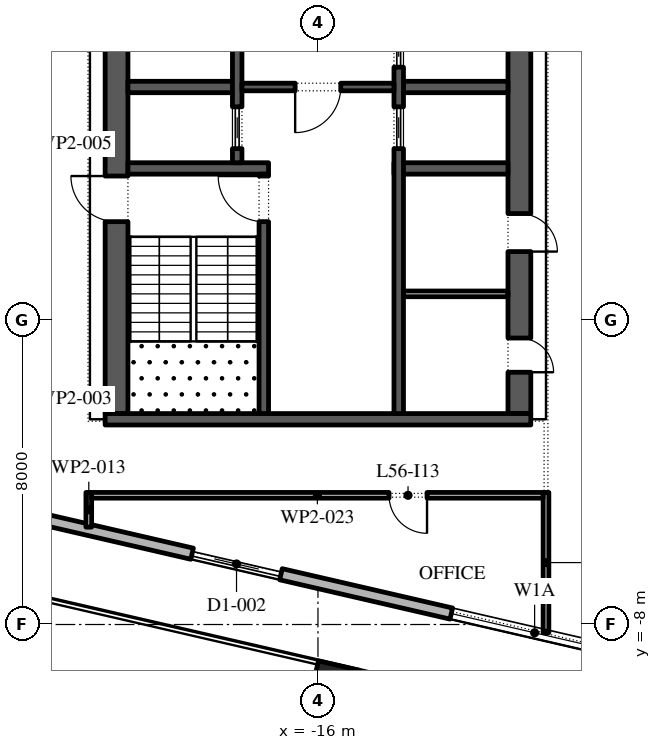
"""IFC4 building model, lengths in metres.
Left out: names, types, materials, properties, quantities, classifications, styles, units other than length and angle.
Written with IfcOpenShell. Run it as: python <this file> out.ifc"""

import sys

from ifc_helpers import new_model, si_unit, direction, frame, frame_2d, origin, origin_2d, place, context, subcontext, project, spatial, rectangle, extrude, element, fill, save


model = new_model("IFC4")
c1 = context("Model", 3, precision=1e-05, world=origin(), true_north=direction((0.0, 1.0)))
c2 = subcontext(c1, "Body", "Model", "MODEL_VIEW")
j1 = project(units=[si_unit("LENGTHUNIT", "METRE"), si_unit("PLANEANGLEUNIT", "RADIAN")], contexts=[c1])
p1 = place(None, origin())
s1 = spatial("IfcSite", under=j1, at=p1, CompositionType="ELEMENT")
p2 = place(p1, origin())
s2 = spatial("IfcBuilding", under=s1, at=p2, CompositionType="ELEMENT")
p3 = place(p2, frame((0.0, 0.0, 259.8)))
s3 = spatial("IfcBuildingStorey", under=s2, at=p3, CompositionType="ELEMENT", Elevation=259.8)
p4 = place(p3, frame((-15.574, -9.617, 0.0), z_axis=(0.0, 0.0, 1.0), x_axis=(0.974370064785, -0.224951054344, 0.0)))
e1 = element("IfcColumn", 1, at=p4, inside=s3, PredefinedType="COLUMN", context=c2, shape_type="SweptSolid", body=[
    extrude(rectangle(XDim=1.1, YDim=1.1, at=origin_2d()), origin(), (0.0, 0.0, 1.0), 4.2),
])
p5 = place(p3, frame((-29.616, -3.758, 0.0), z_axis=(0.0, 0.0, 1.0), x_axis=(0.974370532314, -0.224949029246, 0.0)))
e2 = element("IfcWall", 2, at=p5, inside=s3, PredefinedType="STANDARD", context=c2, shape_type="SweptSolid", body=[
    extrude(rectangle(XDim=48.0, YDim=0.3, at=frame_2d((24.0, 0.0))), origin(), (0.0, 0.0, 1.0), 4.0),
])
p6 = place(p5, frame((1.625, 0.0, 0.45)))
e3 = element("IfcOpeningElement", 3, at=p6, cuts=e2, PredefinedType="OPENING", context=c2, shape_type="SweptSolid", body=[
    extrude(rectangle(XDim=4.5, YDim=3.05, at=frame_2d((2.25, 1.525))), frame((0.0, 0.16, 0.0), z_axis=(0.0, -1.0, 0.0), x_axis=(1.0, 0.0, 0.0)), (0.0, 0.0, 1.0), 0.32),
])
p7 = place(p5, frame((10.575, 0.0, 0.0)))
e4 = element("IfcOpeningElement", 4, at=p7, cuts=e2, PredefinedType="OPENING", context=c2, shape_type="SweptSolid", body=[
    extrude(rectangle(XDim=2.4, YDim=3.5, at=frame_2d((1.2, 1.75))), frame((0.0, 0.16, 0.0), z_axis=(0.0, -1.0, 0.0), x_axis=(1.0, 0.0, 0.0)), (0.0, 0.0, 1.0), 0.32),
])
p8 = place(p5, frame((17.575, 0.0, 0.45)))
e5 = element("IfcOpeningElement", 5, at=p8, cuts=e2, PredefinedType="OPENING", context=c2, shape_type="SweptSolid", body=[
    extrude(rectangle(XDim=4.5, YDim=3.0, at=frame_2d((2.25, 1.5))), frame((0.0, 0.16, 0.0), z_axis=(0.0, -1.0, 0.0), x_axis=(1.0, 0.0, 0.0)), (0.0, 0.0, 1.0), 0.32),
])
p9 = place(p5, frame((25.625, 0.0, 0.45)))
e6 = element("IfcOpeningElement", 6, at=p9, cuts=e2, PredefinedType="OPENING", context=c2, shape_type="SweptSolid", body=[
    extrude(rectangle(XDim=4.5, YDim=2.95, at=frame_2d((2.25, 1.475))), frame((0.0, 0.16, 0.0), z_axis=(0.0, -1.0, 0.0), x_axis=(1.0, 0.0, 0.0)), (0.0, 0.0, 1.0), 0.32),
])
p10 = place(p5, frame((33.675, 0.0, 0.45)))
e7 = element("IfcOpeningElement", 7, at=p10, cuts=e2, PredefinedType="OPENING", context=c2, shape_type="SweptSolid", body=[
    extrude(rectangle(XDim=4.5, YDim=2.825, at=frame_2d((2.25, 1.413))), frame((0.0, 0.16, 0.0), z_axis=(0.0, -1.0, 0.0), x_axis=(1.0, 0.0, 0.0)), (0.0, 0.0, 1.0), 0.32),
])
p11 = place(p5, frame((42.775, 0.0, 0.0)))
e8 = element("IfcOpeningElement", 8, at=p11, cuts=e2, PredefinedType="OPENING", context=c2, shape_type="SweptSolid", body=[
    extrude(rectangle(XDim=2.4, YDim=3.5, at=frame_2d((1.2, 1.75))), frame((0.0, 0.16, 0.0), z_axis=(0.0, -1.0, 0.0), x_axis=(1.0, 0.0, 0.0)), (0.0, 0.0, 1.0), 0.32),
])
p12 = place(p3, frame((-21.359, 48.678, 0.0), z_axis=(0.0, 0.0, 1.0), x_axis=(-0.224949198343, -0.974370493275, 0.0)))
e9 = element("IfcWall", 9, at=p12, inside=s3, PredefinedType="STANDARD", context=c2, shape_type="SweptSolid", body=[
    extrude(rectangle(XDim=49.5, YDim=0.3, at=frame_2d((24.75, 0.0))), origin(), (0.0, 0.0, 1.0), 4.0),
])
p13 = place(p12, frame((1.157, 0.0, 0.45)))
e10 = element("IfcOpeningElement", 10, at=p13, cuts=e9, PredefinedType="OPENING", context=c2, shape_type="SweptSolid", body=[
    extrude(rectangle(XDim=4.5, YDim=3.05, at=frame_2d((2.25, 1.525))), frame((0.0, 0.16, 0.0), z_axis=(0.0, -1.0, 0.0), x_axis=(1.0, 0.0, 0.0)), (0.0, 0.0, 1.0), 0.32),
])
p14 = place(p12, frame((9.171, 0.0, 0.0)))
e11 = element("IfcOpeningElement", 11, at=p14, cuts=e9, PredefinedType="OPENING", context=c2, shape_type="SweptSolid", body=[
    extrude(rectangle(XDim=2.4, YDim=3.5, at=frame_2d((1.2, 1.75))), frame((0.0, 0.16, 0.0), z_axis=(0.0, -1.0, 0.0), x_axis=(1.0, 0.0, 0.0)), (0.0, 0.0, 1.0), 0.32),
])
p15 = place(p12, frame((15.236, 0.0, 0.45)))
e12 = element("IfcOpeningElement", 12, at=p15, cuts=e9, PredefinedType="OPENING", context=c2, shape_type="SweptSolid", body=[
    extrude(rectangle(XDim=4.5, YDim=3.05, at=frame_2d((2.25, 1.525))), frame((0.0, 0.16, 0.0), z_axis=(0.0, -1.0, 0.0), x_axis=(1.0, 0.0, 0.0)), (0.0, 0.0, 1.0), 0.32),
])
p16 = place(p12, frame((22.35, 0.0, 0.45)))
e13 = element("IfcOpeningElement", 13, at=p16, cuts=e9, PredefinedType="OPENING", context=c2, shape_type="SweptSolid", body=[
    extrude(rectangle(XDim=4.5, YDim=3.05, at=frame_2d((2.25, 1.525))), frame((0.0, 0.16, 0.0), z_axis=(0.0, -1.0, 0.0), x_axis=(1.0, 0.0, 0.0)), (0.0, 0.0, 1.0), 0.32),
])
p17 = place(p12, frame((29.464, 0.0, 0.45)))
e14 = element("IfcOpeningElement", 14, at=p17, cuts=e9, PredefinedType="OPENING", context=c2, shape_type="SweptSolid", body=[
    extrude(rectangle(XDim=4.5, YDim=3.05, at=frame_2d((2.25, 1.525))), frame((0.0, 0.16, 0.0), z_axis=(0.0, -1.0, 0.0), x_axis=(1.0, 0.0, 0.0)), (0.0, 0.0, 1.0), 0.32),
])
p18 = place(p12, frame((37.628, 0.0, 0.0)))
e15 = element("IfcOpeningElement", 15, at=p18, cuts=e9, PredefinedType="OPENING", context=c2, shape_type="SweptSolid", body=[
    extrude(rectangle(XDim=2.4, YDim=3.325, at=frame_2d((1.2, 1.663))), frame((0.0, 0.16, 0.0), z_axis=(0.0, -1.0, 0.0), x_axis=(1.0, 0.0, 0.0)), (0.0, 0.0, 1.0), 0.32),
])
p19 = place(p12, frame((43.693, 0.0, 0.45)))
e16 = element("IfcOpeningElement", 16, at=p19, cuts=e9, PredefinedType="OPENING", context=c2, shape_type="SweptSolid", body=[
    extrude(rectangle(XDim=4.5, YDim=2.825, at=frame_2d((2.25, 1.413))), frame((0.0, 0.16, 0.0), z_axis=(0.0, -1.0, 0.0), x_axis=(1.0, 0.0, 0.0)), (0.0, 0.0, 1.0), 0.32),
])
p20 = place(p3, frame((-21.3, -2.45, 0.0), z_axis=(0.0, 0.0, 1.0), x_axis=(0.0, 1.0, 0.0)))
e17 = element("IfcWall", 17, at=p20, inside=s3, PredefinedType="SHEAR", context=c2, shape_type="SweptSolid", body=[
    extrude(rectangle(XDim=27.9, YDim=0.6, at=frame_2d((13.95, 0.0))), origin(), (0.0, 0.0, 1.0), 4.0),
])
p21 = place(p20, frame((5.05, 0.0, 0.0)))
e18 = element("IfcOpeningElement", 18, at=p21, cuts=e17, PredefinedType="OPENING", context=c2, shape_type="SweptSolid", body=[
    extrude(rectangle(XDim=1.2, YDim=2.1, at=frame_2d((0.6, 1.05))), frame((0.0, 0.31, 0.0), z_axis=(0.0, -1.0, 0.0), x_axis=(1.0, 0.0, 0.0)), (0.0, 0.0, 1.0), 0.62),
])
p22 = place(p20, frame((21.65, 0.0, 0.0)))
e19 = element("IfcOpeningElement", 19, at=p22, cuts=e17, PredefinedType="OPENING", context=c2, shape_type="SweptSolid", body=[
    extrude(rectangle(XDim=1.2, YDim=2.1, at=frame_2d((0.6, 1.05))), frame((0.0, 0.31, 0.0), z_axis=(0.0, -1.0, 0.0), x_axis=(1.0, 0.0, 0.0)), (0.0, 0.0, 1.0), 0.62),
])
p23 = place(p3, frame((-10.7, -2.45, 0.0), z_axis=(0.0, 0.0, 1.0), x_axis=(0.0, 1.0, 0.0)))
e20 = element("IfcWall", 20, at=p23, inside=s3, PredefinedType="SHEAR", context=c2, shape_type="SweptSolid", body=[
    extrude(rectangle(XDim=27.9, YDim=0.6, at=frame_2d((13.95, 0.0))), origin(), (0.0, 0.0, 1.0), 4.0),
])
p24 = place(p23, frame((23.65, 0.0, 0.0)))
e21 = element("IfcOpeningElement", 21, at=p24, cuts=e20, PredefinedType="OPENING", context=c2, shape_type="SweptSolid", body=[
    extrude(rectangle(XDim=2.4, YDim=2.1, at=frame_2d((1.2, 1.05))), frame((0.0, 0.31, 0.0), z_axis=(0.0, -1.0, 0.0), x_axis=(1.0, 0.0, 0.0)), (0.0, 0.0, 1.0), 0.62),
])
p25 = place(p23, frame((1.087, 0.0, 0.0)))
e22 = element("IfcOpeningElement", 22, at=p25, cuts=e20, PredefinedType="OPENING", context=c2, shape_type="SweptSolid", body=[
    extrude(rectangle(XDim=0.9, YDim=2.1, at=frame_2d((0.45, 1.05))), frame((0.0, 0.31, 0.0), z_axis=(0.0, -1.0, 0.0), x_axis=(1.0, 0.0, 0.0)), (0.0, 0.0, 1.0), 0.62),
])
p26 = place(p23, frame((4.262, 0.0, 0.0)))
e23 = element("IfcOpeningElement", 23, at=p26, cuts=e20, PredefinedType="OPENING", context=c2, shape_type="SweptSolid", body=[
    extrude(rectangle(XDim=1.0, YDim=2.1, at=frame_2d((0.5, 1.05))), frame((0.0, 0.31, 0.0), z_axis=(0.0, -1.0, 0.0), x_axis=(1.0, 0.0, 0.0)), (0.0, 0.0, 1.0), 0.62),
])
p27 = place(p3, frame((-21.6, -2.6, 0.0), z_axis=(0.0, 0.0, 1.0), x_axis=(1.0, 0.0, 0.0)))
e24 = element("IfcWall", 24, at=p27, inside=s3, PredefinedType="SHEAR", context=c2, shape_type="SweptSolid", body=[
    extrude(rectangle(XDim=11.2, YDim=0.3, at=frame_2d((5.6, 0.0))), origin(), (0.0, 0.0, 1.0), 4.0),
])
p28 = place(p3, frame((-21.0, 4.0, 0.0), z_axis=(0.0, 0.0, 1.0), x_axis=(1.0, 0.0, 0.0)))
e25 = element("IfcWall", 25, at=p28, inside=s3, PredefinedType="SHEAR", context=c2, shape_type="SweptSolid", body=[
    extrude(rectangle(XDim=3.7, YDim=0.3, at=frame_2d((1.85, 0.0))), origin(), (0.0, 0.0, 1.0), 4.0),
])
p29 = place(p3, frame((-17.425, -2.45, 0.0), z_axis=(0.0, 0.0, 1.0), x_axis=(0.0, 1.0, 0.0)))
e26 = element("IfcWall", 26, at=p29, inside=s3, PredefinedType="SHEAR", context=c2, shape_type="SweptSolid", body=[
    extrude(rectangle(XDim=6.3, YDim=0.25, at=frame_2d((3.15, 0.0))), origin(), (0.0, 0.0, 1.0), 4.0),
])
p30 = place(p29, frame((5.05, 0.0, 0.0)))
e27 = element("IfcOpeningElement", 27, at=p30, cuts=e26, PredefinedType="OPENING", context=c2, shape_type="SweptSolid", body=[
    extrude(rectangle(XDim=1.2, YDim=2.1, at=frame_2d((0.6, 1.05))), frame((0.0, 0.135, 0.0), z_axis=(0.0, -1.0, 0.0), x_axis=(1.0, 0.0, 0.0)), (0.0, 0.0, 1.0), 0.27),
])
p31 = place(p3, frame((-21.0, 6.143, 0.0), z_axis=(0.0, 0.0, 1.0), x_axis=(1.0, 0.0, 0.0)))
e28 = element("IfcWall", 28, at=p31, inside=s3, PredefinedType="SHEAR", context=c2, shape_type="SweptSolid", body=[
    extrude(rectangle(XDim=2.75, YDim=0.3, at=frame_2d((1.375, 0.0))), origin(), (0.0, 0.0, 1.0), 4.0),
])
p32 = place(p3, frame((-18.125, 4.15, 0.0), z_axis=(0.0, 0.0, 1.0), x_axis=(0.0, 1.0, 0.0)))
e29 = element("IfcWall", 29, at=p32, inside=s3, PredefinedType="SHEAR", context=c2, shape_type="SweptSolid", body=[
    extrude(rectangle(XDim=14.7, YDim=0.25, at=frame_2d((7.35, 0.0))), origin(), (0.0, 0.0, 1.0), 4.0),
])
p33 = place(p32, frame((6.9, 0.0, 0.0)))
e30 = element("IfcOpeningElement", 30, at=p33, cuts=e29, PredefinedType="OPENING", context=c2, shape_type="SweptSolid", body=[
    extrude(rectangle(XDim=0.9, YDim=2.1, at=frame_2d((0.45, 1.05))), frame((0.0, 0.135, 0.0), z_axis=(0.0, -1.0, 0.0), x_axis=(1.0, 0.0, 0.0)), (0.0, 0.0, 1.0), 0.27),
])
p34 = place(p32, frame((0.371, 0.0, 0.0)))
e31 = element("IfcOpeningElement", 31, at=p34, cuts=e29, PredefinedType="OPENING", context=c2, shape_type="SweptSolid", body=[
    extrude(rectangle(XDim=1.1, YDim=2.1, at=frame_2d((0.55, 1.05))), frame((0.0, 0.135, 0.0), z_axis=(0.0, -1.0, 0.0), x_axis=(1.0, 0.0, 0.0)), (0.0, 0.0, 1.0), 0.27),
])
p35 = place(p32, frame((13.229, 0.0, 0.0)))
e32 = element("IfcOpeningElement", 32, at=p35, cuts=e29, PredefinedType="OPENING", context=c2, shape_type="SweptSolid", body=[
    extrude(rectangle(XDim=1.1, YDim=2.1, at=frame_2d((0.55, 1.05))), frame((0.0, 0.135, 0.0), z_axis=(0.0, -1.0, 0.0), x_axis=(1.0, 0.0, 0.0)), (0.0, 0.0, 1.0), 0.27),
])
p36 = place(p3, frame((-14.0, 4.0, 0.0), z_axis=(0.0, 0.0, 1.0), x_axis=(1.0, 0.0, 0.0)))
e33 = element("IfcWall", 33, at=p36, inside=s3, PredefinedType="SHEAR", context=c2, shape_type="SweptSolid", body=[
    extrude(rectangle(XDim=3.0, YDim=0.3, at=frame_2d((1.5, 0.0))), origin(), (0.0, 0.0, 1.0), 4.0),
])
p37 = place(p3, frame((-13.75, 6.143, 0.0), z_axis=(0.0, 0.0, 1.0), x_axis=(1.0, 0.0, 0.0)))
e34 = element("IfcWall", 34, at=p37, inside=s3, PredefinedType="SHEAR", context=c2, shape_type="SweptSolid", body=[
    extrude(rectangle(XDim=2.75, YDim=0.3, at=frame_2d((1.375, 0.0))), origin(), (0.0, 0.0, 1.0), 4.0),
])
p38 = place(p3, frame((-13.875, -2.45, 0.0), z_axis=(0.0, 0.0, 1.0), x_axis=(0.0, 1.0, 0.0)))
e35 = element("IfcWall", 35, at=p38, inside=s3, PredefinedType="SHEAR", context=c2, shape_type="SweptSolid", body=[
    extrude(rectangle(XDim=21.3, YDim=0.25, at=frame_2d((10.65, 0.0))), origin(), (0.0, 0.0, 1.0), 4.0),
])
p39 = place(p38, frame((17.786, 0.0, 0.0)))
e36 = element("IfcOpeningElement", 36, at=p39, cuts=e35, PredefinedType="OPENING", context=c2, shape_type="SweptSolid", body=[
    extrude(rectangle(XDim=0.9, YDim=2.1, at=frame_2d((0.45, 1.05))), frame((0.0, 0.135, 0.0), z_axis=(0.0, -1.0, 0.0), x_axis=(1.0, 0.0, 0.0)), (0.0, 0.0, 1.0), 0.27),
])
p40 = place(p38, frame((6.971, 0.0, 0.0)))
e37 = element("IfcOpeningElement", 37, at=p40, cuts=e35, PredefinedType="OPENING", context=c2, shape_type="SweptSolid", body=[
    extrude(rectangle(XDim=1.1, YDim=2.1, at=frame_2d((0.55, 1.05))), frame((0.0, 0.135, 0.0), z_axis=(0.0, -1.0, 0.0), x_axis=(1.0, 0.0, 0.0)), (0.0, 0.0, 1.0), 0.27),
])
p41 = place(p38, frame((9.114, 0.0, 0.0)))
e38 = element("IfcOpeningElement", 38, at=p41, cuts=e35, PredefinedType="OPENING", context=c2, shape_type="SweptSolid", body=[
    extrude(rectangle(XDim=1.1, YDim=2.1, at=frame_2d((0.55, 1.05))), frame((0.0, 0.135, 0.0), z_axis=(0.0, -1.0, 0.0), x_axis=(1.0, 0.0, 0.0)), (0.0, 0.0, 1.0), 0.27),
])
p42 = place(p38, frame((11.257, 0.0, 0.0)))
e39 = element("IfcOpeningElement", 39, at=p42, cuts=e35, PredefinedType="OPENING", context=c2, shape_type="SweptSolid", body=[
    extrude(rectangle(XDim=1.1, YDim=2.1, at=frame_2d((0.55, 1.05))), frame((0.0, 0.135, 0.0), z_axis=(0.0, -1.0, 0.0), x_axis=(1.0, 0.0, 0.0)), (0.0, 0.0, 1.0), 0.27),
])
p43 = place(p38, frame((13.4, 0.0, 0.0)))
e40 = element("IfcOpeningElement", 40, at=p43, cuts=e35, PredefinedType="OPENING", context=c2, shape_type="SweptSolid", body=[
    extrude(rectangle(XDim=1.1, YDim=2.1, at=frame_2d((0.55, 1.05))), frame((0.0, 0.135, 0.0), z_axis=(0.0, -1.0, 0.0), x_axis=(1.0, 0.0, 0.0)), (0.0, 0.0, 1.0), 0.27),
])
p44 = place(p3, frame((-18.0, 6.143, 0.0), z_axis=(0.0, 0.0, 1.0), x_axis=(1.0, 0.0, 0.0)))
e41 = element("IfcWall", 41, at=p44, inside=s3, PredefinedType="SHEAR", context=c2, shape_type="SweptSolid", body=[
    extrude(rectangle(XDim=4.0, YDim=0.2, at=frame_2d((2.0, 0.0))), origin(), (0.0, 0.0, 1.0), 4.0),
])
p45 = place(p44, frame((1.4, 0.0, 0.0)))
e42 = element("IfcOpeningElement", 42, at=p45, cuts=e41, PredefinedType="OPENING", context=c2, shape_type="SweptSolid", body=[
    extrude(rectangle(XDim=1.2, YDim=2.1, at=frame_2d((0.6, 1.05))), frame((0.0, 0.11, 0.0), z_axis=(0.0, -1.0, 0.0), x_axis=(1.0, 0.0, 0.0)), (0.0, 0.0, 1.0), 0.22),
])
p46 = place(p3, frame((-13.75, 0.7, 0.0), z_axis=(0.0, 0.0, 1.0), x_axis=(1.0, 0.0, 0.0)))
e43 = element("IfcWall", 43, at=p46, inside=s3, PredefinedType="PARTITIONING", context=c2, shape_type="SweptSolid", body=[
    extrude(rectangle(XDim=2.75, YDim=0.15, at=frame_2d((1.375, 0.0))), origin(), (0.0, 0.0, 1.0), 4.0),
])
p47 = place(p3, frame((-22.03, -4.525, 0.0), z_axis=(0.0, 0.0, 1.0), x_axis=(0.0, -1.0, 0.0)))
e44 = element("IfcWall", 44, at=p47, inside=s3, PredefinedType="PARTITIONING", context=c2, shape_type="SweptSolid", body=[
    extrude(rectangle(XDim=0.913, YDim=0.15, at=frame_2d((0.457, 0.0))), origin(), (0.0, 0.0, 1.0), 4.0),
])
p48 = place(p3, frame((-10.0, -8.216, 0.0), z_axis=(0.0, 0.0, 1.0), x_axis=(0.0, 1.0, 0.0)))
e45 = element("IfcWall", 45, at=p48, inside=s3, PredefinedType="PARTITIONING", context=c2, shape_type="SweptSolid", body=[
    extrude(rectangle(XDim=3.691, YDim=0.15, at=frame_2d((1.846, 0.0))), origin(), (0.0, 0.0, 1.0), 4.0),
])
p49 = place(p3, frame((-10.075, -4.6, 0.0), z_axis=(0.0, 0.0, 1.0), x_axis=(-1.0, 0.0, 0.0)))
e46 = element("IfcWall", 46, at=p49, inside=s3, PredefinedType="PARTITIONING", context=c2, shape_type="SweptSolid", body=[
    extrude(rectangle(XDim=11.88, YDim=0.15, at=frame_2d((5.94, 0.0))), origin(), (0.0, 0.0, 1.0), 4.0),
])
p50 = place(p49, frame((3.055, 0.0, 0.0)))
e47 = element("IfcOpeningElement", 47, at=p50, cuts=e46, PredefinedType="OPENING", context=c2, shape_type="SweptSolid", body=[
    extrude(rectangle(XDim=1.0, YDim=2.1, at=frame_2d((0.5, 1.05))), frame((0.0, 0.085, 0.0), z_axis=(0.0, -1.0, 0.0), x_axis=(1.0, 0.0, 0.0)), (0.0, 0.0, 1.0), 0.17),
])
p51 = place(p7, origin())
e48 = element("IfcDoor", 48, at=p51, inside=s3, OperationType="DOUBLE_DOOR_SLIDING", PredefinedType="DOOR", context=c2, shape_type="SweptSolid", body=[
    extrude(rectangle(XDim=2.4, YDim=3.5, at=frame_2d((1.2, 1.75))), frame((0.0, 0.025, 0.0), z_axis=(0.0, -1.0, 0.0), x_axis=(1.0, 0.0, 0.0)), (0.0, 0.0, 1.0), 0.05),
])
fill(e4, e48)
p52 = place(p8, origin())
e49 = element("IfcWindow", 49, at=p52, inside=s3, PartitioningType="DOUBLE_PANEL_VERTICAL", PredefinedType="WINDOW", context=c2, shape_type="SweptSolid", body=[
    extrude(rectangle(XDim=4.5, YDim=3.0, at=frame_2d((2.25, 1.5))), frame((0.0, 0.03, 0.0), z_axis=(0.0, -1.0, 0.0), x_axis=(1.0, 0.0, 0.0)), (0.0, 0.0, 1.0), 0.06),
])
fill(e5, e49)
p53 = place(p34, origin())
e50 = element("IfcDoor", 50, at=p53, inside=s3, OperationType="SLIDING_TO_LEFT", PredefinedType="DOOR", context=c2, shape_type="SweptSolid", body=[
    extrude(rectangle(XDim=1.1, YDim=2.1, at=frame_2d((0.55, 1.05))), frame((0.0, 0.025, 0.0), z_axis=(0.0, -1.0, 0.0), x_axis=(1.0, 0.0, 0.0)), (0.0, 0.0, 1.0), 0.05),
])
fill(e31, e50)
p54 = place(p40, origin())
e51 = element("IfcDoor", 51, at=p54, inside=s3, OperationType="SLIDING_TO_LEFT", PredefinedType="DOOR", context=c2, shape_type="SweptSolid", body=[
    extrude(rectangle(XDim=1.1, YDim=2.1, at=frame_2d((0.55, 1.05))), frame((0.0, 0.025, 0.0), z_axis=(0.0, -1.0, 0.0), x_axis=(1.0, 0.0, 0.0)), (0.0, 0.0, 1.0), 0.05),
])
fill(e37, e51)
p55 = place(p41, origin())
e52 = element("IfcDoor", 52, at=p55, inside=s3, OperationType="SLIDING_TO_LEFT", PredefinedType="DOOR", context=c2, shape_type="SweptSolid", body=[
    extrude(rectangle(XDim=1.1, YDim=2.1, at=frame_2d((0.55, 1.05))), frame((0.0, 0.025, 0.0), z_axis=(0.0, -1.0, 0.0), x_axis=(1.0, 0.0, 0.0)), (0.0, 0.0, 1.0), 0.05),
])
fill(e38, e52)
p56 = place(p45, frame((1.2, 0.0, 0.0), z_axis=(0.0, 0.0, 1.0), x_axis=(-1.0, 0.0, 0.0)))
e53 = element("IfcDoor", 53, at=p56, inside=s3, OperationType="SINGLE_SWING_LEFT", PredefinedType="DOOR", context=c2, shape_type="SweptSolid", body=[
    extrude(rectangle(XDim=1.2, YDim=2.1, at=frame_2d((0.6, 1.05))), frame((0.0, 0.025, 0.0), z_axis=(0.0, -1.0, 0.0), x_axis=(1.0, 0.0, 0.0)), (0.0, 0.0, 1.0), 0.05),
])
fill(e42, e53)
p57 = place(p30, origin())
e54 = element("IfcDoor", 54, at=p57, inside=s3, OperationType="SINGLE_SWING_LEFT", PredefinedType="DOOR", context=c2, shape_type="SweptSolid", body=[
    extrude(rectangle(XDim=1.2, YDim=2.1, at=frame_2d((0.6, 1.05))), frame((0.0, 0.025, 0.0), z_axis=(0.0, -1.0, 0.0), x_axis=(1.0, 0.0, 0.0)), (0.0, 0.0, 1.0), 0.05),
])
fill(e27, e54)
p58 = place(p21, origin())
e55 = element("IfcDoor", 55, at=p58, inside=s3, OperationType="SINGLE_SWING_LEFT", PredefinedType="DOOR", context=c2, shape_type="SweptSolid", body=[
    extrude(rectangle(XDim=1.2, YDim=2.1, at=frame_2d((0.6, 1.05))), frame((0.0, 0.025, 0.0), z_axis=(0.0, -1.0, 0.0), x_axis=(1.0, 0.0, 0.0)), (0.0, 0.0, 1.0), 0.05),
])
fill(e18, e55)
p59 = place(p25, frame((0.9, 0.55, 0.0), z_axis=(0.0, 0.0, 1.0), x_axis=(-1.0, 0.0, 0.0)))
e56 = element("IfcDoor", 56, at=p59, inside=s3, OperationType="SINGLE_SWING_LEFT", PredefinedType="DOOR", context=c2, shape_type="SweptSolid", body=[
    extrude(rectangle(XDim=0.9, YDim=2.1, at=frame_2d((0.45, 1.05))), frame((0.0, 0.3, 0.0), z_axis=(0.0, -1.0, 0.0), x_axis=(1.0, 0.0, 0.0)), (0.0, 0.0, 1.0), 0.05),
])
fill(e22, e56)
p60 = place(p26, frame((1.0, 0.55, 0.0), z_axis=(0.0, 0.0, 1.0), x_axis=(-1.0, 0.0, 0.0)))
e57 = element("IfcDoor", 57, at=p60, inside=s3, OperationType="SINGLE_SWING_LEFT", PredefinedType="DOOR", context=c2, shape_type="SweptSolid", body=[
    extrude(rectangle(XDim=1.0, YDim=2.1, at=frame_2d((0.5, 1.05))), frame((0.0, 0.3, 0.0), z_axis=(0.0, -1.0, 0.0), x_axis=(1.0, 0.0, 0.0)), (0.0, 0.0, 1.0), 0.05),
])
fill(e23, e57)
p61 = place(p50, origin())
e58 = element("IfcDoor", 58, at=p61, inside=s3, OperationType="SINGLE_SWING_RIGHT", PredefinedType="DOOR", context=c2, shape_type="SweptSolid", body=[
    extrude(rectangle(XDim=1.0, YDim=2.1, at=frame_2d((0.5, 1.05))), frame((0.0, 0.025, 0.0), z_axis=(0.0, -1.0, 0.0), x_axis=(1.0, 0.0, 0.0)), (0.0, 0.0, 1.0), 0.05),
])
fill(e47, e58)
save(model, sys.argv[1])
